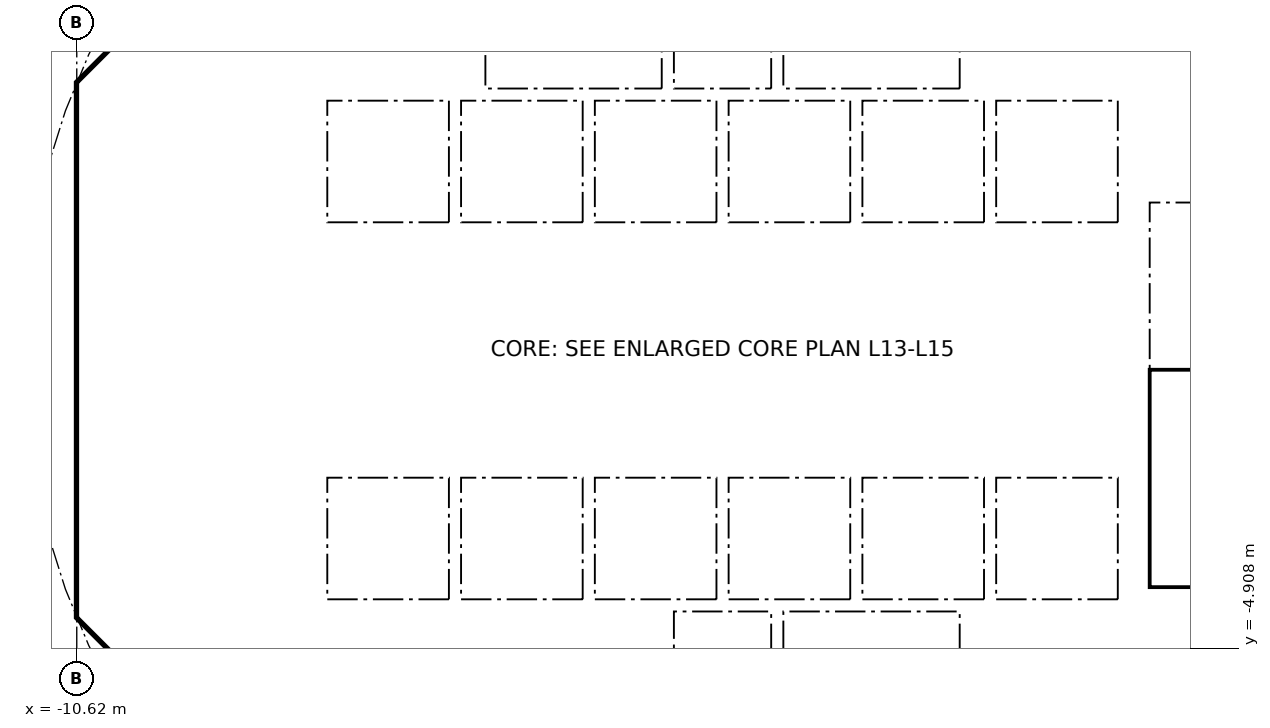
"""IFC4 building model, lengths in metres.
Left out: names, types, materials, properties, quantities, classifications, styles, units other than length and angle.
Written with IfcOpenShell. Run it as: python <this file> out.ifc"""

import sys

from ifc_helpers import new_model, si_unit, direction, frame, frame_2d, origin, place, context, subcontext, project, spatial, polyline, rectangle, outline, extrude, element, fill, save


model = new_model("IFC4")
c1 = context("Model", 3, precision=1e-05, world=origin(), true_north=direction((0.0, 1.0)))
c2 = subcontext(c1, "Body", "Model", "MODEL_VIEW")
j1 = project(units=[si_unit("LENGTHUNIT", "METRE"), si_unit("PLANEANGLEUNIT", "RADIAN")], contexts=[c1])
p1 = place(None, origin())
s1 = spatial("IfcSite", under=j1, at=p1, CompositionType="ELEMENT")
p2 = place(p1, origin())
s2 = spatial("IfcBuilding", under=s1, at=p2, CompositionType="ELEMENT")
p3 = place(p2, frame((0.0, 0.0, 60.3)))
s3 = spatial("IfcBuildingStorey", under=s2, at=p3, CompositionType="ELEMENT", Elevation=60.3)
p4 = place(p3, frame((9.988, 4.613, 0.0), z_axis=(0.0, 0.0, 1.0), x_axis=(-0.707106781187, 0.707106781187, 0.0)))
e1 = element("IfcWall", 1, at=p4, inside=s3, PredefinedType="SHEAR", context=c2, shape_type="SweptSolid", body=[
    extrude(rectangle(XDim=7.602, YDim=0.6, at=frame_2d((3.801, 0.0))), origin(), (0.0, 0.0, 1.0), 3.44),
])
p5 = place(p4, frame((3.201, 0.0, 0.0)))
e2 = element("IfcOpeningElement", 2, at=p5, cuts=e1, PredefinedType="OPENING", context=c2, shape_type="SweptSolid", body=[
    extrude(rectangle(XDim=1.2, YDim=2.1, at=frame_2d((0.6, 1.05))), frame((0.0, 0.31, 0.0), z_axis=(0.0, -1.0, 0.0), x_axis=(1.0, 0.0, 0.0)), (0.0, 0.0, 1.0), 0.62),
])
p6 = place(p3, frame((-4.613, 9.988, 0.0), z_axis=(0.0, 0.0, 1.0), x_axis=(-0.707106781187, -0.707106781187, 0.0)))
e3 = element("IfcWall", 3, at=p6, inside=s3, PredefinedType="SHEAR", context=c2, shape_type="SweptSolid", body=[
    extrude(rectangle(XDim=7.602, YDim=0.6, at=frame_2d((3.801, 0.0))), origin(), (0.0, 0.0, 1.0), 3.44),
])
p7 = place(p6, frame((0.351, 0.0, 0.0)))
e4 = element("IfcOpeningElement", 4, at=p7, cuts=e3, PredefinedType="OPENING", context=c2, shape_type="SweptSolid", body=[
    extrude(rectangle(XDim=1.1, YDim=2.1, at=frame_2d((0.55, 1.05))), frame((0.0, 0.31, 0.0), z_axis=(0.0, -1.0, 0.0), x_axis=(1.0, 0.0, 0.0)), (0.0, 0.0, 1.0), 0.62),
])
p8 = place(p3, frame((-10.325, 3.801, 0.0), z_axis=(0.0, 0.0, 1.0), x_axis=(0.0, -1.0, 0.0)))
e5 = element("IfcWall", 5, at=p8, inside=s3, PredefinedType="SHEAR", context=c2, shape_type="SweptSolid", body=[
    extrude(rectangle(XDim=7.602, YDim=0.6, at=frame_2d((3.801, 0.0))), origin(), (0.0, 0.0, 1.0), 3.44),
])
p9 = place(p8, frame((0.651, 0.0, 0.0)))
e6 = element("IfcOpeningElement", 6, at=p9, cuts=e5, PredefinedType="OPENING", context=c2, shape_type="SweptSolid", body=[
    extrude(rectangle(XDim=1.5, YDim=2.1, at=frame_2d((0.75, 1.05))), frame((0.0, 0.31, 0.0), z_axis=(0.0, -1.0, 0.0), x_axis=(1.0, 0.0, 0.0)), (0.0, 0.0, 1.0), 0.62),
])
p10 = place(p8, frame((5.451, 0.0, 0.0)))
e7 = element("IfcOpeningElement", 7, at=p10, cuts=e5, PredefinedType="OPENING", context=c2, shape_type="SweptSolid", body=[
    extrude(rectangle(XDim=1.5, YDim=2.1, at=frame_2d((0.75, 1.05))), frame((0.0, 0.31, 0.0), z_axis=(0.0, -1.0, 0.0), x_axis=(1.0, 0.0, 0.0)), (0.0, 0.0, 1.0), 0.62),
])
p11 = place(p3, frame((-9.988, -4.613, 0.0), z_axis=(0.0, 0.0, 1.0), x_axis=(0.707106781187, -0.707106781187, 0.0)))
e8 = element("IfcWall", 8, at=p11, inside=s3, PredefinedType="SHEAR", context=c2, shape_type="SweptSolid", body=[
    extrude(rectangle(XDim=7.602, YDim=0.6, at=frame_2d((3.801, 0.0))), origin(), (0.0, 0.0, 1.0), 3.44),
])
p12 = place(p11, frame((6.151, 0.0, 0.0)))
e9 = element("IfcOpeningElement", 9, at=p12, cuts=e8, PredefinedType="OPENING", context=c2, shape_type="SweptSolid", body=[
    extrude(rectangle(XDim=1.1, YDim=2.1, at=frame_2d((0.55, 1.05))), frame((0.0, 0.31, 0.0), z_axis=(0.0, -1.0, 0.0), x_axis=(1.0, 0.0, 0.0)), (0.0, 0.0, 1.0), 0.62),
])
p13 = place(p3, frame((4.613, -9.988, 0.0), z_axis=(0.0, 0.0, 1.0), x_axis=(0.707106781187, 0.707106781187, 0.0)))
e10 = element("IfcWall", 10, at=p13, inside=s3, PredefinedType="SHEAR", context=c2, shape_type="SweptSolid", body=[
    extrude(rectangle(XDim=7.602, YDim=0.6, at=frame_2d((3.801, 0.0))), origin(), (0.0, 0.0, 1.0), 3.44),
])
p14 = place(p13, frame((3.201, 0.0, 0.0)))
e11 = element("IfcOpeningElement", 11, at=p14, cuts=e10, PredefinedType="OPENING", context=c2, shape_type="SweptSolid", body=[
    extrude(rectangle(XDim=1.2, YDim=2.1, at=frame_2d((0.6, 1.05))), frame((0.0, 0.31, 0.0), z_axis=(0.0, -1.0, 0.0), x_axis=(1.0, 0.0, 0.0)), (0.0, 0.0, 1.0), 0.62),
])
p15 = place(p3, frame((-5.8, 4.3, 0.0), z_axis=(0.0, 0.0, 1.0), x_axis=(0.0, 1.0, 0.0)))
e12 = element("IfcWall", 12, at=p15, inside=s3, PredefinedType="PARTITIONING", context=c2, shape_type="SweptSolid", body=[
    extrude(rectangle(XDim=3.927, YDim=0.15, at=frame_2d((1.963, 0.0))), origin(), (0.0, 0.0, 1.0), 3.44),
])
p16 = place(p15, frame((0.413, 0.0, 0.0)))
e13 = element("IfcOpeningElement", 13, at=p16, cuts=e12, PredefinedType="OPENING", context=c2, shape_type="SweptSolid", body=[
    extrude(rectangle(XDim=0.9, YDim=2.1, at=frame_2d((0.45, 1.05))), frame((0.0, 0.085, 0.0), z_axis=(0.0, -1.0, 0.0), x_axis=(1.0, 0.0, 0.0)), (0.0, 0.0, 1.0), 0.17),
])
p17 = place(p15, frame((2.489, 0.0, 0.0)))
e14 = element("IfcOpeningElement", 14, at=p17, cuts=e12, PredefinedType="OPENING", context=c2, shape_type="SweptSolid", body=[
    extrude(rectangle(XDim=0.9, YDim=2.1, at=frame_2d((0.45, 1.05))), frame((0.0, 0.085, 0.0), z_axis=(0.0, -1.0, 0.0), x_axis=(1.0, 0.0, 0.0)), (0.0, 0.0, 1.0), 0.17),
])
p18 = place(p3, frame((4.0, 4.3, 0.0), z_axis=(0.0, 0.0, 1.0), x_axis=(0.0, 1.0, 0.0)))
e15 = element("IfcWall", 15, at=p18, inside=s3, PredefinedType="SOLIDWALL", context=c2, shape_type="SweptSolid", body=[
    extrude(rectangle(XDim=2.2, YDim=0.2, at=frame_2d((1.1, 0.0))), origin(), (0.0, 0.0, 1.0), 3.44),
])
p19 = place(p18, frame((0.55, 0.0, 0.0)))
e16 = element("IfcOpeningElement", 16, at=p19, cuts=e15, PredefinedType="OPENING", context=c2, shape_type="SweptSolid", body=[
    extrude(rectangle(XDim=1.1, YDim=2.1, at=frame_2d((0.55, 1.05))), frame((0.0, 0.11, 0.0), z_axis=(0.0, -1.0, 0.0), x_axis=(1.0, 0.0, 0.0)), (0.0, 0.0, 1.0), 0.22),
])
p20 = place(p3, frame((-4.0, 4.3, 0.0), z_axis=(0.0, 0.0, 1.0), x_axis=(0.0, 1.0, 0.0)))
e17 = element("IfcWall", 17, at=p20, inside=s3, PredefinedType="SOLIDWALL", context=c2, shape_type="SweptSolid", body=[
    extrude(rectangle(XDim=2.2, YDim=0.2, at=frame_2d((1.1, 0.0))), origin(), (0.0, 0.0, 1.0), 3.44),
])
p21 = place(p20, frame((0.55, 0.0, 0.0)))
e18 = element("IfcOpeningElement", 18, at=p21, cuts=e17, PredefinedType="OPENING", context=c2, shape_type="SweptSolid", body=[
    extrude(rectangle(XDim=1.1, YDim=2.1, at=frame_2d((0.55, 1.05))), frame((0.0, 0.11, 0.0), z_axis=(0.0, -1.0, 0.0), x_axis=(1.0, 0.0, 0.0)), (0.0, 0.0, 1.0), 0.22),
])
p22 = place(p3, frame((-6.7, 2.0, 0.0), z_axis=(0.0, 0.0, 1.0), x_axis=(1.0, 0.0, 0.0)))
e19 = element("IfcWall", 19, at=p22, inside=s3, PredefinedType="SOLIDWALL", context=c2, shape_type="SweptSolid", body=[
    extrude(rectangle(XDim=13.4, YDim=0.2, at=frame_2d((6.7, 0.0))), origin(), (0.0, 0.0, 1.0), 3.44),
])
p23 = place(p22, frame((0.65, 0.0, 0.0)))
e20 = element("IfcOpeningElement", 20, at=p23, cuts=e19, PredefinedType="OPENING", context=c2, shape_type="SweptSolid", body=[
    extrude(rectangle(XDim=1.1, YDim=2.1, at=frame_2d((0.55, 1.05))), frame((0.0, 0.11, 0.0), z_axis=(0.0, -1.0, 0.0), x_axis=(1.0, 0.0, 0.0)), (0.0, 0.0, 1.0), 0.22),
])
p24 = place(p22, frame((2.85, 0.0, 0.0)))
e21 = element("IfcOpeningElement", 21, at=p24, cuts=e19, PredefinedType="OPENING", context=c2, shape_type="SweptSolid", body=[
    extrude(rectangle(XDim=1.1, YDim=2.1, at=frame_2d((0.55, 1.05))), frame((0.0, 0.11, 0.0), z_axis=(0.0, -1.0, 0.0), x_axis=(1.0, 0.0, 0.0)), (0.0, 0.0, 1.0), 0.22),
])
p25 = place(p22, frame((5.05, 0.0, 0.0)))
e22 = element("IfcOpeningElement", 22, at=p25, cuts=e19, PredefinedType="OPENING", context=c2, shape_type="SweptSolid", body=[
    extrude(rectangle(XDim=1.1, YDim=2.1, at=frame_2d((0.55, 1.05))), frame((0.0, 0.11, 0.0), z_axis=(0.0, -1.0, 0.0), x_axis=(1.0, 0.0, 0.0)), (0.0, 0.0, 1.0), 0.22),
])
p26 = place(p3, frame((6.7, 4.0, 0.0), z_axis=(0.0, 0.0, 1.0), x_axis=(1.0, 0.0, 0.0)))
e23 = element("IfcWall", 23, at=p26, inside=s3, PredefinedType="SOLIDWALL", context=c2, shape_type="SweptSolid", body=[
    extrude(rectangle(XDim=3.325, YDim=0.2, at=frame_2d((1.662, 0.0))), origin(), (0.0, 0.0, 1.0), 3.44),
])
p27 = place(p26, frame((1.25, 0.0, 0.0)))
e24 = element("IfcOpeningElement", 24, at=p27, cuts=e23, PredefinedType="OPENING", context=c2, shape_type="SweptSolid", body=[
    extrude(rectangle(XDim=1.1, YDim=2.1, at=frame_2d((0.55, 1.05))), frame((0.0, 0.11, 0.0), z_axis=(0.0, -1.0, 0.0), x_axis=(1.0, 0.0, 0.0)), (0.0, 0.0, 1.0), 0.22),
])
p28 = place(p3, frame((-7.4, -6.627, 0.0), z_axis=(0.0, 0.0, 1.0), x_axis=(0.0, 1.0, 0.0)))
e25 = element("IfcWall", 25, at=p28, inside=s3, PredefinedType="PARTITIONING", context=c2, shape_type="SweptSolid", body=[
    extrude(rectangle(XDim=2.527, YDim=0.15, at=frame_2d((1.263, 0.0))), origin(), (0.0, 0.0, 1.0), 3.44),
])
p29 = place(p28, frame((0.776, 0.0, 0.0)))
e26 = element("IfcOpeningElement", 26, at=p29, cuts=e25, PredefinedType="OPENING", context=c2, shape_type="SweptSolid", body=[
    extrude(rectangle(XDim=0.9, YDim=2.1, at=frame_2d((0.45, 1.05))), frame((0.0, 0.085, 0.0), z_axis=(0.0, -1.0, 0.0), x_axis=(1.0, 0.0, 0.0)), (0.0, 0.0, 1.0), 0.17),
])
p30 = place(p3, frame((4.0, -6.5, 0.0), z_axis=(0.0, 0.0, 1.0), x_axis=(0.0, 1.0, 0.0)))
e27 = element("IfcWall", 27, at=p30, inside=s3, PredefinedType="SOLIDWALL", context=c2, shape_type="SweptSolid", body=[
    extrude(rectangle(XDim=2.2, YDim=0.2, at=frame_2d((1.1, 0.0))), origin(), (0.0, 0.0, 1.0), 3.44),
])
p31 = place(p30, frame((0.55, 0.0, 0.0)))
e28 = element("IfcOpeningElement", 28, at=p31, cuts=e27, PredefinedType="OPENING", context=c2, shape_type="SweptSolid", body=[
    extrude(rectangle(XDim=1.1, YDim=2.1, at=frame_2d((0.55, 1.05))), frame((0.0, 0.11, 0.0), z_axis=(0.0, -1.0, 0.0), x_axis=(1.0, 0.0, 0.0)), (0.0, 0.0, 1.0), 0.22),
])
p32 = place(p3, frame((-4.0, -6.5, 0.0), z_axis=(0.0, 0.0, 1.0), x_axis=(0.0, 1.0, 0.0)))
e29 = element("IfcWall", 29, at=p32, inside=s3, PredefinedType="SOLIDWALL", context=c2, shape_type="SweptSolid", body=[
    extrude(rectangle(XDim=2.2, YDim=0.2, at=frame_2d((1.1, 0.0))), origin(), (0.0, 0.0, 1.0), 3.44),
])
p33 = place(p32, frame((0.65, 0.0, 0.0)))
e30 = element("IfcOpeningElement", 30, at=p33, cuts=e29, PredefinedType="OPENING", context=c2, shape_type="SweptSolid", body=[
    extrude(rectangle(XDim=0.9, YDim=2.1, at=frame_2d((0.45, 1.05))), frame((0.0, 0.11, 0.0), z_axis=(0.0, -1.0, 0.0), x_axis=(1.0, 0.0, 0.0)), (0.0, 0.0, 1.0), 0.22),
])
p34 = place(p3, frame((-6.7, -2.0, 0.0), z_axis=(0.0, 0.0, 1.0), x_axis=(1.0, 0.0, 0.0)))
e31 = element("IfcWall", 31, at=p34, inside=s3, PredefinedType="SOLIDWALL", context=c2, shape_type="SweptSolid", body=[
    extrude(rectangle(XDim=13.4, YDim=0.2, at=frame_2d((6.7, 0.0))), origin(), (0.0, 0.0, 1.0), 3.44),
])
p35 = place(p34, frame((0.65, 0.0, 0.0)))
e32 = element("IfcOpeningElement", 32, at=p35, cuts=e31, PredefinedType="OPENING", context=c2, shape_type="SweptSolid", body=[
    extrude(rectangle(XDim=1.1, YDim=2.1, at=frame_2d((0.55, 1.05))), frame((0.0, 0.11, 0.0), z_axis=(0.0, -1.0, 0.0), x_axis=(1.0, 0.0, 0.0)), (0.0, 0.0, 1.0), 0.22),
])
p36 = place(p34, frame((2.85, 0.0, 0.0)))
e33 = element("IfcOpeningElement", 33, at=p36, cuts=e31, PredefinedType="OPENING", context=c2, shape_type="SweptSolid", body=[
    extrude(rectangle(XDim=1.1, YDim=2.1, at=frame_2d((0.55, 1.05))), frame((0.0, 0.11, 0.0), z_axis=(0.0, -1.0, 0.0), x_axis=(1.0, 0.0, 0.0)), (0.0, 0.0, 1.0), 0.22),
])
p37 = place(p3, origin())
e34 = element("IfcWall", 34, at=p37, inside=s3, PredefinedType="SHEAR", context=c2, shape_type="SweptSolid", body=[
    extrude(outline(polyline([(-10.625, -3.801), (-10.025, -3.801), (-10.025, -4.152), (-9.776, -4.401), (-10.2, -4.825), (-10.625, -4.401), (-10.625, -3.801)])), origin(), (0.0, 0.0, 1.0), 3.44),
])
p38 = place(p3, origin())
e35 = element("IfcWall", 35, at=p38, inside=s3, PredefinedType="SHEAR", context=c2, shape_type="SweptSolid", body=[
    extrude(outline(polyline([(-10.2, 4.825), (-9.776, 4.401), (-10.025, 4.152), (-10.025, 3.801), (-10.625, 3.801), (-10.625, 4.401), (-10.2, 4.825)])), origin(), (0.0, 0.0, 1.0), 3.44),
])
for number, where, z_axis, x_axis in (
    (36, (-10.025, -4.0, 0.0), (0.0, 0.0, 1.0), (1.0, 0.0, 0.0)),
    (37, (-10.025, 4.0, 0.0), (0.0, 0.0, 1.0), (1.0, 0.0, 0.0)),
):
    element("IfcWall", number, at=place(p3, frame(where, z_axis=z_axis, x_axis=x_axis)), inside=s3, PredefinedType="PARTITIONING", context=c2, shape_type="SweptSolid", body=[
        extrude(rectangle(XDim=3.325, YDim=0.2, at=frame_2d((1.662, 0.0))), origin(), (0.0, 0.0, 1.0), 3.44),
    ])
for number, where, z_axis, x_axis in (
    (38, (-0.9, -6.5, 0.0), (0.0, 0.0, 1.0), (0.0, 1.0, 0.0)),
    (39, (0.9, -6.5, 0.0), (0.0, 0.0, 1.0), (0.0, 1.0, 0.0)),
):
    element("IfcWall", number, at=place(p3, frame(where, z_axis=z_axis, x_axis=x_axis)), inside=s3, PredefinedType="SOLIDWALL", context=c2, shape_type="SweptSolid", body=[
        extrude(rectangle(XDim=2.2, YDim=0.2, at=frame_2d((1.1, 0.0))), origin(), (0.0, 0.0, 1.0), 3.44),
    ])
p39 = place(p3, origin())
e40 = element("IfcWall", 40, at=p39, inside=s3, PredefinedType="SOLIDWALL", context=c2, shape_type="SweptSolid", body=[
    extrude(outline(polyline([(-6.7, -2.1), (-6.5, -2.1), (-6.5, -4.1), (-4.5, -4.1), (-4.5, -2.1), (-4.3, -2.1), (-4.3, -4.1), (-2.3, -4.1), (-2.3, -2.1), (-2.1, -2.1), (-2.1, -4.1), (-0.1, -4.1), (-0.1, -2.1), (0.1, -2.1), (0.1, -4.1), (2.1, -4.1), (2.1, -2.1), (2.3, -2.1), (2.3, -4.1), (4.3, -4.1), (4.3, -2.1), (4.5, -2.1), (4.5, -4.1), (6.5, -4.1), (6.5, -2.1), (6.7, -2.1), (6.7, -4.3), (-6.7, -4.3), (-6.7, -2.1)])), origin(), (0.0, 0.0, 1.0), 3.44),
])
for number, where, z_axis, x_axis in (
    (41, (-0.9, 4.3, 0.0), (0.0, 0.0, 1.0), (0.0, 1.0, 0.0)),
    (42, (0.9, 4.3, 0.0), (0.0, 0.0, 1.0), (0.0, 1.0, 0.0)),
):
    element("IfcWall", number, at=place(p3, frame(where, z_axis=z_axis, x_axis=x_axis)), inside=s3, PredefinedType="SOLIDWALL", context=c2, shape_type="SweptSolid", body=[
        extrude(rectangle(XDim=2.2, YDim=0.2, at=frame_2d((1.1, 0.0))), origin(), (0.0, 0.0, 1.0), 3.44),
    ])
p40 = place(p3, origin())
e43 = element("IfcWall", 43, at=p40, inside=s3, PredefinedType="SOLIDWALL", context=c2, shape_type="SweptSolid", body=[
    extrude(outline(polyline([(-6.5, 2.1), (-6.7, 2.1), (-6.7, 4.3), (6.7, 4.3), (6.7, 2.1), (6.5, 2.1), (6.5, 4.1), (4.5, 4.1), (4.5, 2.1), (4.3, 2.1), (4.3, 4.1), (2.3, 4.1), (2.3, 2.1), (2.1, 2.1), (2.1, 4.1), (0.1, 4.1), (0.1, 2.1), (-0.1, 2.1), (-0.1, 4.1), (-2.1, 4.1), (-2.1, 2.1), (-2.3, 2.1), (-2.3, 4.1), (-4.3, 4.1), (-4.3, 2.1), (-4.5, 2.1), (-4.5, 4.1), (-6.5, 4.1), (-6.5, 2.1)])), origin(), (0.0, 0.0, 1.0), 3.44),
])
p41 = place(p3, origin())
e44 = element("IfcWall", 44, at=p41, inside=s3, PredefinedType="SOLIDWALL", context=c2, shape_type="SweptSolid", body=[
    extrude(outline(polyline([(7.025, -3.9), (6.7, -3.9), (6.7, 3.9), (7.025, 3.9), (7.025, -3.9)])), origin(), (0.0, 0.0, 1.0), 3.44),
])
p42 = place(p3, origin())
e45 = element("IfcWall", 45, at=p42, inside=s3, PredefinedType="SOLIDWALL", context=c2, shape_type="SweptSolid", body=[
    extrude(outline(polyline([(10.025, -4.1), (6.7, -4.1), (6.7, -3.9), (10.025, -3.9), (10.025, -4.1)])), origin(), (0.0, 0.0, 1.0), 3.44),
])
p43 = place(p23, origin())
e46 = element("IfcDoor", 46, at=p43, inside=s3, OperationType="DOUBLE_DOOR_SLIDING", PredefinedType="DOOR", context=c2, shape_type="SweptSolid", body=[
    extrude(rectangle(XDim=1.1, YDim=2.1, at=frame_2d((0.55, 1.05))), frame((0.0, 0.025, 0.0), z_axis=(0.0, -1.0, 0.0), x_axis=(1.0, 0.0, 0.0)), (0.0, 0.0, 1.0), 0.05),
])
fill(e20, e46)
p44 = place(p24, origin())
e47 = element("IfcDoor", 47, at=p44, inside=s3, OperationType="DOUBLE_DOOR_SLIDING", PredefinedType="DOOR", context=c2, shape_type="SweptSolid", body=[
    extrude(rectangle(XDim=1.1, YDim=2.1, at=frame_2d((0.55, 1.05))), frame((0.0, 0.025, 0.0), z_axis=(0.0, -1.0, 0.0), x_axis=(1.0, 0.0, 0.0)), (0.0, 0.0, 1.0), 0.05),
])
fill(e21, e47)
p45 = place(p25, origin())
e48 = element("IfcDoor", 48, at=p45, inside=s3, OperationType="DOUBLE_DOOR_SLIDING", PredefinedType="DOOR", context=c2, shape_type="SweptSolid", body=[
    extrude(rectangle(XDim=1.1, YDim=2.1, at=frame_2d((0.55, 1.05))), frame((0.0, 0.025, 0.0), z_axis=(0.0, -1.0, 0.0), x_axis=(1.0, 0.0, 0.0)), (0.0, 0.0, 1.0), 0.05),
])
fill(e22, e48)
p46 = place(p35, origin())
e49 = element("IfcDoor", 49, at=p46, inside=s3, OperationType="DOUBLE_DOOR_SLIDING", PredefinedType="DOOR", context=c2, shape_type="SweptSolid", body=[
    extrude(rectangle(XDim=1.1, YDim=2.1, at=frame_2d((0.55, 1.05))), frame((0.0, 0.025, 0.0), z_axis=(0.0, -1.0, 0.0), x_axis=(1.0, 0.0, 0.0)), (0.0, 0.0, 1.0), 0.05),
])
fill(e32, e49)
p47 = place(p36, origin())
e50 = element("IfcDoor", 50, at=p47, inside=s3, OperationType="DOUBLE_DOOR_SLIDING", PredefinedType="DOOR", context=c2, shape_type="SweptSolid", body=[
    extrude(rectangle(XDim=1.1, YDim=2.1, at=frame_2d((0.55, 1.05))), frame((0.0, 0.025, 0.0), z_axis=(0.0, -1.0, 0.0), x_axis=(1.0, 0.0, 0.0)), (0.0, 0.0, 1.0), 0.05),
])
fill(e33, e50)
p48 = place(p19, origin())
e51 = element("IfcDoor", 51, at=p48, inside=s3, OperationType="DOUBLE_DOOR_SLIDING", PredefinedType="DOOR", context=c2, shape_type="SweptSolid", body=[
    extrude(rectangle(XDim=1.1, YDim=2.1, at=frame_2d((0.55, 1.05))), frame((0.0, 0.025, 0.0), z_axis=(0.0, -1.0, 0.0), x_axis=(1.0, 0.0, 0.0)), (0.0, 0.0, 1.0), 0.05),
])
fill(e16, e51)
p49 = place(p31, origin())
e52 = element("IfcDoor", 52, at=p49, inside=s3, OperationType="DOUBLE_DOOR_SLIDING", PredefinedType="DOOR", context=c2, shape_type="SweptSolid", body=[
    extrude(rectangle(XDim=1.1, YDim=2.1, at=frame_2d((0.55, 1.05))), frame((0.0, 0.025, 0.0), z_axis=(0.0, -1.0, 0.0), x_axis=(1.0, 0.0, 0.0)), (0.0, 0.0, 1.0), 0.05),
])
fill(e28, e52)
p50 = place(p21, origin())
e53 = element("IfcDoor", 53, at=p50, inside=s3, OperationType="DOUBLE_DOOR_SLIDING", PredefinedType="DOOR", context=c2, shape_type="SweptSolid", body=[
    extrude(rectangle(XDim=1.1, YDim=2.1, at=frame_2d((0.55, 1.05))), frame((0.0, 0.025, 0.0), z_axis=(0.0, -1.0, 0.0), x_axis=(1.0, 0.0, 0.0)), (0.0, 0.0, 1.0), 0.05),
])
fill(e18, e53)
p51 = place(p16, origin())
e54 = element("IfcDoor", 54, at=p51, inside=s3, OperationType="SINGLE_SWING_RIGHT", PredefinedType="DOOR", context=c2, shape_type="SweptSolid", body=[
    extrude(rectangle(XDim=0.9, YDim=2.1, at=frame_2d((0.45, 1.05))), frame((0.0, 0.025, 0.0), z_axis=(0.0, -1.0, 0.0), x_axis=(1.0, 0.0, 0.0)), (0.0, 0.0, 1.0), 0.05),
])
fill(e13, e54)
p52 = place(p9, origin())
e55 = element("IfcDoor", 55, at=p52, inside=s3, OperationType="DOUBLE_DOOR_SINGLE_SWING", PredefinedType="DOOR", context=c2, shape_type="SweptSolid", body=[
    extrude(rectangle(XDim=1.5, YDim=2.1, at=frame_2d((0.75, 1.05))), frame((0.0, 0.025, 0.0), z_axis=(0.0, -1.0, 0.0), x_axis=(1.0, 0.0, 0.0)), (0.0, 0.0, 1.0), 0.05),
])
fill(e6, e55)
p53 = place(p10, origin())
e56 = element("IfcDoor", 56, at=p53, inside=s3, OperationType="DOUBLE_DOOR_SINGLE_SWING", PredefinedType="DOOR", context=c2, shape_type="SweptSolid", body=[
    extrude(rectangle(XDim=1.5, YDim=2.1, at=frame_2d((0.75, 1.05))), frame((0.0, 0.025, 0.0), z_axis=(0.0, -1.0, 0.0), x_axis=(1.0, 0.0, 0.0)), (0.0, 0.0, 1.0), 0.05),
])
fill(e7, e56)
save(model, sys.argv[1])
